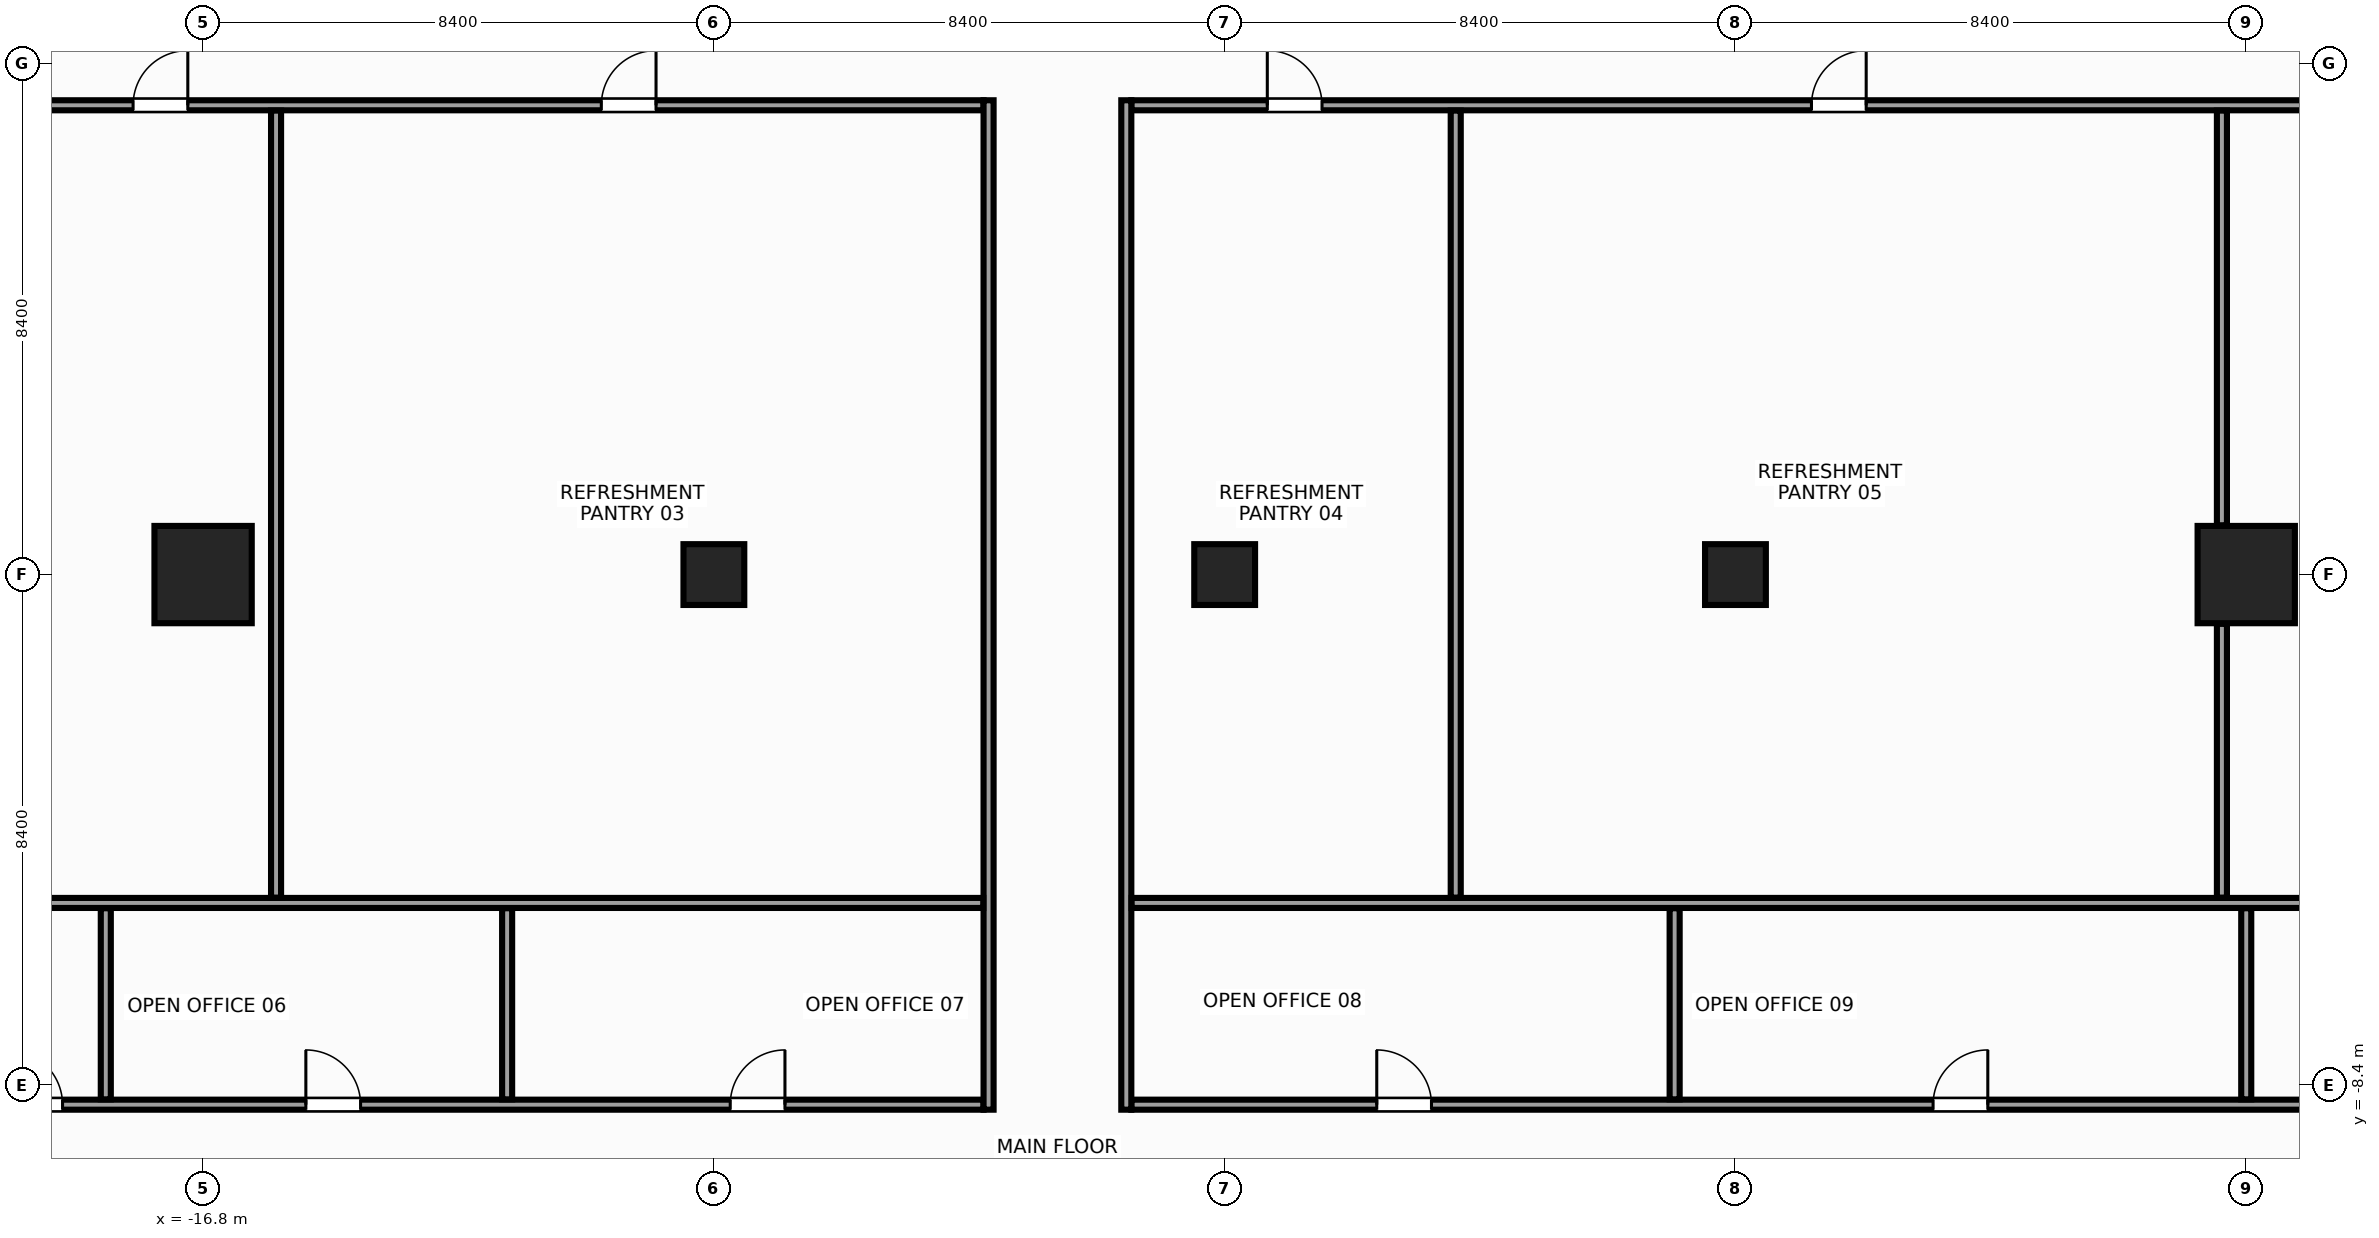
"""IFC4 building model, lengths in metres.
Left out: names, types, materials, properties, quantities, classifications, styles, units other than length and angle.
Written with IfcOpenShell. Run it as: python <this file> out.ifc"""

import sys

from ifc_helpers import new_model, si_unit, direction, frame, frame_2d, origin, origin_with_axes, origin_2d, place, context, subcontext, project, spatial, rectangle, hollow_rectangle, extrude, source, transform, mapped, element, fill, save


model = new_model("IFC4")
c1 = context("Model", 3, precision=1e-05, world=origin(), true_north=direction((0.0, 1.0)))
c2 = subcontext(c1, "Body", "Model", "MODEL_VIEW")
j1 = project(units=[si_unit("LENGTHUNIT", "METRE"), si_unit("PLANEANGLEUNIT", "RADIAN")], contexts=[c1])
p1 = place(None, origin())
s1 = spatial("IfcSite", under=j1, at=p1, CompositionType="ELEMENT")
p2 = place(p1, origin())
s2 = spatial("IfcBuilding", under=s1, at=p2, CompositionType="ELEMENT")
p3 = place(p2, frame((0.0, 0.0, 102.8)))
s3 = spatial("IfcBuildingStorey", under=s2, at=p3, CompositionType="ELEMENT", Elevation=102.8)
m1 = source(origin(), c2, "Body", "SweptSolid", [
    extrude(rectangle(XDim=1.6, YDim=1.6, at=origin_2d()), origin(), (0.0, 0.0, 1.0), 3.6),
])
for number, where, z_axis, x_axis in (
    (1, (-16.8, 0.0, 0.0), (0.0, 0.0, 1.0), (1.0, 0.0, 0.0)),
    (2, (16.8, 0.0, 0.0), (0.0, 0.0, 1.0), (1.0, 0.0, 0.0)),
):
    element("IfcColumn", number, at=place(p3, frame(where, z_axis=z_axis, x_axis=x_axis)), inside=s3, PredefinedType="COLUMN", context=c2, shape_type="MappedRepresentation", body=[
        mapped(m1, transform((0.0, 0.0, 0.0), x_axis=(1.0, 0.0, 0.0), y_axis=(0.0, 1.0, 0.0), z_axis=(0.0, 0.0, 1.0), scale=1.0)),
    ])
m2 = source(origin(), c2, "Body", "SweptSolid", [
    extrude(hollow_rectangle(XDim=1.0, YDim=1.0, WallThickness=0.045, at=origin_2d()), origin(), (0.0, 0.0, 1.0), 3.6),
])
for number, where, z_axis, x_axis in (
    (3, (-8.4, 0.0, 0.0), (0.0, 0.0, 1.0), (1.0, 0.0, 0.0)),
    (4, (8.4, 0.0, 0.0), (0.0, 0.0, 1.0), (1.0, 0.0, 0.0)),
):
    element("IfcColumn", number, at=place(p3, frame(where, z_axis=z_axis, x_axis=x_axis)), inside=s3, PredefinedType="COLUMN", context=c2, shape_type="MappedRepresentation", body=[
        mapped(m2, transform((0.0, 0.0, 0.0), x_axis=(1.0, 0.0, 0.0), y_axis=(0.0, 1.0, 0.0), z_axis=(0.0, 0.0, 1.0), scale=1.0)),
    ])
m3 = source(origin(), c2, "Body", "SweptSolid", [
    extrude(rectangle(XDim=1.0, YDim=1.0, at=origin_2d()), origin(), (0.0, 0.0, 1.0), 3.6),
])
p4 = place(p3, origin_with_axes())
e5 = element("IfcColumn", 5, at=p4, inside=s3, PredefinedType="COLUMN", context=c2, shape_type="MappedRepresentation", body=[
    mapped(m3, transform((0.0, 0.0, 0.0), x_axis=(1.0, 0.0, 0.0), y_axis=(0.0, 1.0, 0.0), z_axis=(0.0, 0.0, 1.0), scale=1.0)),
])
m4 = source(origin(), c2, "Body", "SweptSolid", [
    extrude(rectangle(XDim=16.8, YDim=0.165, at=frame_2d((8.4, 0.0))), origin(), (0.0, 0.0, 1.0), 2.745),
])
p5 = place(p3, frame((-20.765, 7.718, 0.0), z_axis=(0.0, 0.0, 1.0), x_axis=(1.0, 0.0, 0.0)))
e6 = element("IfcWall", 6, at=p5, inside=s3, PredefinedType="PARTITIONING", context=c2, shape_type="MappedRepresentation", body=[
    mapped(m4, transform((0.0, 0.0, 0.0), x_axis=(1.0, 0.0, 0.0), y_axis=(0.0, 1.0, 0.0), z_axis=(0.0, 0.0, 1.0), scale=1.0)),
])
p6 = place(p5, frame((2.814, 0.0, 0.0)))
e7 = element("IfcOpeningElement", 7, at=p6, cuts=e6, PredefinedType="OPENING", context=c2, shape_type="SweptSolid", body=[
    extrude(rectangle(XDim=0.9, YDim=2.15, at=frame_2d((0.45, 1.075))), frame((0.0, 0.094, 0.0), z_axis=(0.0, -1.0, 0.0), x_axis=(1.0, 0.0, 0.0)), (0.0, 0.0, 1.0), 0.189),
])
p7 = place(p5, frame((10.514, 0.0, 0.0)))
e8 = element("IfcOpeningElement", 8, at=p7, cuts=e6, PredefinedType="OPENING", context=c2, shape_type="SweptSolid", body=[
    extrude(rectangle(XDim=0.9, YDim=2.15, at=frame_2d((0.45, 1.075))), frame((0.0, 0.094, 0.0), z_axis=(0.0, -1.0, 0.0), x_axis=(1.0, 0.0, 0.0)), (0.0, 0.0, 1.0), 0.189),
])
m5 = source(origin(), c2, "Body", "SweptSolid", [
    extrude(rectangle(XDim=22.3, YDim=0.165, at=frame_2d((11.15, 0.0))), origin(), (0.0, 0.0, 1.0), 2.745),
])
p8 = place(p3, frame((-1.535, 7.718, 0.0), z_axis=(0.0, 0.0, 1.0), x_axis=(1.0, 0.0, 0.0)))
e9 = element("IfcWall", 9, at=p8, inside=s3, PredefinedType="PARTITIONING", context=c2, shape_type="MappedRepresentation", body=[
    mapped(m5, transform((0.0, 0.0, 0.0), x_axis=(1.0, 0.0, 0.0), y_axis=(0.0, 1.0, 0.0), z_axis=(0.0, 0.0, 1.0), scale=1.0)),
])
p9 = place(p8, frame((19.646, 0.0, 0.0)))
e10 = element("IfcOpeningElement", 10, at=p9, cuts=e9, PredefinedType="OPENING", context=c2, shape_type="SweptSolid", body=[
    extrude(rectangle(XDim=0.9, YDim=2.15, at=frame_2d((0.45, 1.075))), frame((0.0, 0.094, 0.0), z_axis=(0.0, -1.0, 0.0), x_axis=(1.0, 0.0, 0.0)), (0.0, 0.0, 1.0), 0.189),
])
p10 = place(p8, frame((2.236, 0.0, 0.0)))
e11 = element("IfcOpeningElement", 11, at=p10, cuts=e9, PredefinedType="OPENING", context=c2, shape_type="SweptSolid", body=[
    extrude(rectangle(XDim=0.9, YDim=2.15, at=frame_2d((0.45, 1.075))), frame((0.0, 0.094, 0.0), z_axis=(0.0, -1.0, 0.0), x_axis=(1.0, 0.0, 0.0)), (0.0, 0.0, 1.0), 0.189),
])
p11 = place(p8, frame((11.185, 0.0, 0.0)))
e12 = element("IfcOpeningElement", 12, at=p11, cuts=e9, PredefinedType="OPENING", context=c2, shape_type="SweptSolid", body=[
    extrude(rectangle(XDim=0.9, YDim=2.15, at=frame_2d((0.45, 1.075))), frame((0.0, 0.094, 0.0), z_axis=(0.0, -1.0, 0.0), x_axis=(1.0, 0.0, 0.0)), (0.0, 0.0, 1.0), 0.189),
])
p12 = place(p3, frame((-20.765, -8.718, 0.0), z_axis=(0.0, 0.0, 1.0), x_axis=(1.0, 0.0, 0.0)))
e13 = element("IfcWall", 13, at=p12, inside=s3, PredefinedType="PARTITIONING", context=c2, shape_type="MappedRepresentation", body=[
    mapped(m4, transform((0.0, 0.0, 0.0), x_axis=(1.0, 0.0, 0.0), y_axis=(0.0, 1.0, 0.0), z_axis=(0.0, 0.0, 1.0), scale=1.0)),
])
p13 = place(p12, frame((5.655, 0.0, 0.0)))
e14 = element("IfcOpeningElement", 14, at=p13, cuts=e13, PredefinedType="OPENING", context=c2, shape_type="SweptSolid", body=[
    extrude(rectangle(XDim=0.9, YDim=2.15, at=frame_2d((0.45, 1.075))), frame((0.0, 0.094, 0.0), z_axis=(0.0, -1.0, 0.0), x_axis=(1.0, 0.0, 0.0)), (0.0, 0.0, 1.0), 0.189),
])
p14 = place(p12, frame((12.634, 0.0, 0.0)))
e15 = element("IfcOpeningElement", 15, at=p14, cuts=e13, PredefinedType="OPENING", context=c2, shape_type="SweptSolid", body=[
    extrude(rectangle(XDim=0.9, YDim=2.15, at=frame_2d((0.45, 1.075))), frame((0.0, 0.094, 0.0), z_axis=(0.0, -1.0, 0.0), x_axis=(1.0, 0.0, 0.0)), (0.0, 0.0, 1.0), 0.189),
])
p15 = place(p12, frame((0.754, 0.0, 0.0)))
e16 = element("IfcOpeningElement", 16, at=p15, cuts=e13, PredefinedType="OPENING", context=c2, shape_type="SweptSolid", body=[
    extrude(rectangle(XDim=0.9, YDim=2.15, at=frame_2d((0.45, 1.075))), frame((0.0, 0.094, 0.0), z_axis=(0.0, -1.0, 0.0), x_axis=(1.0, 0.0, 0.0)), (0.0, 0.0, 1.0), 0.189),
])
p16 = place(p3, frame((-1.535, -8.718, 0.0), z_axis=(0.0, 0.0, 1.0), x_axis=(1.0, 0.0, 0.0)))
e17 = element("IfcWall", 17, at=p16, inside=s3, PredefinedType="PARTITIONING", context=c2, shape_type="MappedRepresentation", body=[
    mapped(m5, transform((0.0, 0.0, 0.0), x_axis=(1.0, 0.0, 0.0), y_axis=(0.0, 1.0, 0.0), z_axis=(0.0, 0.0, 1.0), scale=1.0)),
])
p17 = place(p16, frame((4.036, 0.0, 0.0)))
e18 = element("IfcOpeningElement", 18, at=p17, cuts=e17, PredefinedType="OPENING", context=c2, shape_type="SweptSolid", body=[
    extrude(rectangle(XDim=0.9, YDim=2.15, at=frame_2d((0.45, 1.075))), frame((0.0, 0.094, 0.0), z_axis=(0.0, -1.0, 0.0), x_axis=(1.0, 0.0, 0.0)), (0.0, 0.0, 1.0), 0.189),
])
p18 = place(p16, frame((13.185, 0.0, 0.0)))
e19 = element("IfcOpeningElement", 19, at=p18, cuts=e17, PredefinedType="OPENING", context=c2, shape_type="SweptSolid", body=[
    extrude(rectangle(XDim=0.9, YDim=2.15, at=frame_2d((0.45, 1.075))), frame((0.0, 0.094, 0.0), z_axis=(0.0, -1.0, 0.0), x_axis=(1.0, 0.0, 0.0)), (0.0, 0.0, 1.0), 0.189),
])
p19 = place(p16, frame((19.846, 0.0, 0.0)))
e20 = element("IfcOpeningElement", 20, at=p19, cuts=e17, PredefinedType="OPENING", context=c2, shape_type="SweptSolid", body=[
    extrude(rectangle(XDim=0.9, YDim=2.15, at=frame_2d((0.45, 1.075))), frame((0.0, 0.094, 0.0), z_axis=(0.0, -1.0, 0.0), x_axis=(1.0, 0.0, 0.0)), (0.0, 0.0, 1.0), 0.189),
])
m6 = source(origin(), c2, "Body", "SweptSolid", [
    extrude(rectangle(XDim=16.6, YDim=0.165, at=frame_2d((8.3, 0.0))), origin(), (0.0, 0.0, 1.0), 2.645),
])
for number, where, z_axis, x_axis in (
    (21, (-3.883, -8.8, 0.0), (0.0, 0.0, 1.0), (0.0, 1.0, 0.0)),
    (22, (-1.617, -8.8, 0.0), (0.0, 0.0, 1.0), (0.0, 1.0, 0.0)),
):
    element("IfcWall", number, at=place(p3, frame(where, z_axis=z_axis, x_axis=x_axis)), inside=s3, PredefinedType="PARTITIONING", context=c2, shape_type="MappedRepresentation", body=[
        mapped(m6, transform((0.0, 0.0, 0.0), x_axis=(1.0, 0.0, 0.0), y_axis=(0.0, 1.0, 0.0), z_axis=(0.0, 0.0, 1.0), scale=1.0)),
    ])
m7 = source(origin(), c2, "Body", "SweptSolid", [
    extrude(rectangle(XDim=21.38, YDim=0.165, at=frame_2d((10.69, 0.0))), origin(), (0.0, 0.0, 1.0), 2.745),
])
p20 = place(p3, frame((-25.35, -5.4, 0.0), z_axis=(0.0, 0.0, 1.0), x_axis=(1.0, 0.0, 0.0)))
e23 = element("IfcWall", 23, at=p20, inside=s3, PredefinedType="PARTITIONING", context=c2, shape_type="MappedRepresentation", body=[
    mapped(m7, transform((0.0, 0.0, 0.0), x_axis=(1.0, 0.0, 0.0), y_axis=(0.0, 1.0, 0.0), z_axis=(0.0, 0.0, 1.0), scale=1.0)),
])
m8 = source(origin(), c2, "Body", "SweptSolid", [
    extrude(rectangle(XDim=26.88, YDim=0.165, at=frame_2d((13.44, 0.0))), origin(), (0.0, 0.0, 1.0), 2.745),
])
p21 = place(p3, frame((-1.53, -5.4, 0.0), z_axis=(0.0, 0.0, 1.0), x_axis=(1.0, 0.0, 0.0)))
e24 = element("IfcWall", 24, at=p21, inside=s3, PredefinedType="PARTITIONING", context=c2, shape_type="MappedRepresentation", body=[
    mapped(m8, transform((0.0, 0.0, 0.0), x_axis=(1.0, 0.0, 0.0), y_axis=(0.0, 1.0, 0.0), z_axis=(0.0, 0.0, 1.0), scale=1.0)),
])
m9 = source(origin(), c2, "Body", "SweptSolid", [
    extrude(rectangle(XDim=12.942, YDim=0.165, at=frame_2d((6.471, 0.0))), origin(), (0.0, 0.0, 1.0), 2.645),
])
for number, where, z_axis, x_axis in (
    (25, (-15.6, -5.312, 0.0), (0.0, 0.0, 1.0), (0.0, 1.0, 0.0)),
    (26, (3.8, -5.312, 0.0), (0.0, 0.0, 1.0), (0.0, 1.0, 0.0)),
):
    element("IfcWall", number, at=place(p3, frame(where, z_axis=z_axis, x_axis=x_axis)), inside=s3, PredefinedType="PARTITIONING", context=c2, shape_type="MappedRepresentation", body=[
        mapped(m9, transform((0.0, 0.0, 0.0), x_axis=(1.0, 0.0, 0.0), y_axis=(0.0, 1.0, 0.0), z_axis=(0.0, 0.0, 1.0), scale=1.0)),
    ])
m10 = source(origin(), c2, "Body", "SweptSolid", [
    extrude(rectangle(XDim=4.502, YDim=0.165, at=frame_2d((2.251, 0.0))), origin(), (0.0, 0.0, 1.0), 3.36),
])
p22 = place(p3, frame((16.4, -5.312, 0.0), z_axis=(0.0, 0.0, 1.0), x_axis=(0.0, 1.0, 0.0)))
e27 = element("IfcWall", 27, at=p22, inside=s3, PredefinedType="PARTITIONING", context=c2, shape_type="MappedRepresentation", body=[
    mapped(m10, transform((0.0, 0.0, 0.0), x_axis=(1.0, 0.0, 0.0), y_axis=(0.0, 1.0, 0.0), z_axis=(0.0, 0.0, 1.0), scale=1.0)),
])
m11 = source(origin(), c2, "Body", "SweptSolid", [
    extrude(rectangle(XDim=6.82, YDim=0.165, at=frame_2d((3.41, 0.0))), origin(), (0.0, 0.0, 1.0), 2.645),
])
p23 = place(p3, frame((16.4, 0.81, 0.0), z_axis=(0.0, 0.0, 1.0), x_axis=(0.0, 1.0, 0.0)))
e28 = element("IfcWall", 28, at=p23, inside=s3, PredefinedType="PARTITIONING", context=c2, shape_type="MappedRepresentation", body=[
    mapped(m11, transform((0.0, 0.0, 0.0), x_axis=(1.0, 0.0, 0.0), y_axis=(0.0, 1.0, 0.0), z_axis=(0.0, 0.0, 1.0), scale=1.0)),
])
m12 = source(origin(), c2, "Body", "SweptSolid", [
    extrude(rectangle(XDim=3.142, YDim=0.165, at=frame_2d((1.571, 0.0))), origin(), (0.0, 0.0, 1.0), 3.36),
])
for number, where, z_axis, x_axis in (
    (29, (-18.4, -8.63, 0.0), (0.0, 0.0, 1.0), (0.0, 1.0, 0.0)),
    (30, (-11.8, -8.63, 0.0), (0.0, 0.0, 1.0), (0.0, 1.0, 0.0)),
    (31, (7.4, -8.63, 0.0), (0.0, 0.0, 1.0), (0.0, 1.0, 0.0)),
):
    element("IfcWall", number, at=place(p3, frame(where, z_axis=z_axis, x_axis=x_axis)), inside=s3, PredefinedType="PARTITIONING", context=c2, shape_type="MappedRepresentation", body=[
        mapped(m12, transform((0.0, 0.0, 0.0), x_axis=(1.0, 0.0, 0.0), y_axis=(0.0, 1.0, 0.0), z_axis=(0.0, 0.0, 1.0), scale=1.0)),
    ])
m13 = source(origin(), c2, "Body", "SweptSolid", [
    extrude(rectangle(XDim=3.142, YDim=0.165, at=frame_2d((1.571, 0.0))), origin(), (0.0, 0.0, 1.0), 2.745),
])
p24 = place(p3, frame((16.8, -8.63, 0.0), z_axis=(0.0, 0.0, 1.0), x_axis=(0.0, 1.0, 0.0)))
e32 = element("IfcWall", 32, at=p24, inside=s3, PredefinedType="PARTITIONING", context=c2, shape_type="MappedRepresentation", body=[
    mapped(m13, transform((0.0, 0.0, 0.0), x_axis=(1.0, 0.0, 0.0), y_axis=(0.0, 1.0, 0.0), z_axis=(0.0, 0.0, 1.0), scale=1.0)),
])
m14 = source(origin(), c2, "Body", "SweptSolid", [
    extrude(rectangle(XDim=0.9, YDim=2.15, at=frame_2d((0.45, 1.075))), frame((0.0, 0.025, 0.0), z_axis=(0.0, -1.0, 0.0), x_axis=(1.0, 0.0, 0.0)), (0.0, 0.0, 1.0), 0.05),
])
p25 = place(p6, origin())
e33 = element("IfcDoor", 33, at=p25, inside=s3, OperationType="SINGLE_SWING_RIGHT", PredefinedType="DOOR", context=c2, shape_type="MappedRepresentation", body=[
    mapped(m14, transform((0.0, 0.0, 0.0), x_axis=(1.0, 0.0, 0.0), y_axis=(0.0, 1.0, 0.0), z_axis=(0.0, 0.0, 1.0), scale=1.0)),
])
fill(e7, e33)
p26 = place(p7, origin())
e34 = element("IfcDoor", 34, at=p26, inside=s3, OperationType="SINGLE_SWING_RIGHT", PredefinedType="DOOR", context=c2, shape_type="MappedRepresentation", body=[
    mapped(m14, transform((0.0, 0.0, 0.0), x_axis=(1.0, 0.0, 0.0), y_axis=(0.0, 1.0, 0.0), z_axis=(0.0, 0.0, 1.0), scale=1.0)),
])
fill(e8, e34)
p27 = place(p10, origin())
e35 = element("IfcDoor", 35, at=p27, inside=s3, OperationType="SINGLE_SWING_LEFT", PredefinedType="DOOR", context=c2, shape_type="MappedRepresentation", body=[
    mapped(m14, transform((0.0, 0.0, 0.0), x_axis=(1.0, 0.0, 0.0), y_axis=(0.0, 1.0, 0.0), z_axis=(0.0, 0.0, 1.0), scale=1.0)),
])
fill(e11, e35)
p28 = place(p11, origin())
e36 = element("IfcDoor", 36, at=p28, inside=s3, OperationType="SINGLE_SWING_RIGHT", PredefinedType="DOOR", context=c2, shape_type="MappedRepresentation", body=[
    mapped(m14, transform((0.0, 0.0, 0.0), x_axis=(1.0, 0.0, 0.0), y_axis=(0.0, 1.0, 0.0), z_axis=(0.0, 0.0, 1.0), scale=1.0)),
])
fill(e12, e36)
p29 = place(p13, origin())
e37 = element("IfcDoor", 37, at=p29, inside=s3, OperationType="SINGLE_SWING_LEFT", PredefinedType="DOOR", context=c2, shape_type="MappedRepresentation", body=[
    mapped(m14, transform((0.0, 0.0, 0.0), x_axis=(1.0, 0.0, 0.0), y_axis=(0.0, 1.0, 0.0), z_axis=(0.0, 0.0, 1.0), scale=1.0)),
])
fill(e14, e37)
p30 = place(p14, origin())
e38 = element("IfcDoor", 38, at=p30, inside=s3, OperationType="SINGLE_SWING_RIGHT", PredefinedType="DOOR", context=c2, shape_type="MappedRepresentation", body=[
    mapped(m14, transform((0.0, 0.0, 0.0), x_axis=(1.0, 0.0, 0.0), y_axis=(0.0, 1.0, 0.0), z_axis=(0.0, 0.0, 1.0), scale=1.0)),
])
fill(e15, e38)
p31 = place(p17, origin())
e39 = element("IfcDoor", 39, at=p31, inside=s3, OperationType="SINGLE_SWING_LEFT", PredefinedType="DOOR", context=c2, shape_type="MappedRepresentation", body=[
    mapped(m14, transform((0.0, 0.0, 0.0), x_axis=(1.0, 0.0, 0.0), y_axis=(0.0, 1.0, 0.0), z_axis=(0.0, 0.0, 1.0), scale=1.0)),
])
fill(e18, e39)
p32 = place(p18, origin())
e40 = element("IfcDoor", 40, at=p32, inside=s3, OperationType="SINGLE_SWING_RIGHT", PredefinedType="DOOR", context=c2, shape_type="MappedRepresentation", body=[
    mapped(m14, transform((0.0, 0.0, 0.0), x_axis=(1.0, 0.0, 0.0), y_axis=(0.0, 1.0, 0.0), z_axis=(0.0, 0.0, 1.0), scale=1.0)),
])
fill(e19, e40)
p33 = place(p15, origin())
e41 = element("IfcDoor", 41, at=p33, inside=s3, OperationType="SINGLE_SWING_LEFT", PredefinedType="DOOR", context=c2, shape_type="MappedRepresentation", body=[
    mapped(m14, transform((0.0, 0.0, 0.0), x_axis=(1.0, 0.0, 0.0), y_axis=(0.0, 1.0, 0.0), z_axis=(0.0, 0.0, 1.0), scale=1.0)),
])
fill(e16, e41)
save(model, sys.argv[1])
